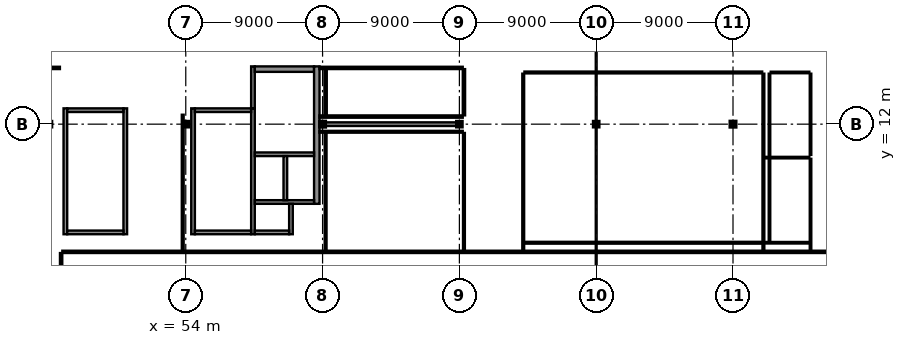
"""IFC4 building model, lengths in metres.
Left out: names, types, materials, properties, quantities, classifications, styles, units other than length and angle.
Written with IfcOpenShell. Run it as: python <this file> out.ifc"""

import sys

from ifc_helpers import new_model, si_unit, direction, frame, frame_2d, origin, origin_2d, place, context, subcontext, project, spatial, rectangle, i_section, extrude, element, fill, save


model = new_model("IFC4")
c1 = context("Model", 3, precision=1e-05, world=origin(), true_north=direction((0.0, 1.0)))
c2 = subcontext(c1, "Body", "Model", "MODEL_VIEW")
j1 = project(units=[si_unit("LENGTHUNIT", "METRE"), si_unit("PLANEANGLEUNIT", "RADIAN")], contexts=[c1])
p1 = place(None, origin())
s1 = spatial("IfcSite", under=j1, at=p1, CompositionType="ELEMENT")
p2 = place(p1, origin())
s2 = spatial("IfcBuilding", under=s1, at=p2, CompositionType="ELEMENT")
p3 = place(p2, frame((0.0, 0.0, 35.4)))
s3 = spatial("IfcBuildingStorey", under=s2, at=p3, CompositionType="ELEMENT", Elevation=35.4)
p4 = place(p3, frame((54.0, 12.0, 0.0), z_axis=(0.0, 0.0, 1.0), x_axis=(1.0, 0.0, 0.0)))
e1 = element("IfcColumn", 1, at=p4, inside=s3, PredefinedType="COLUMN", context=c2, shape_type="SweptSolid", body=[
    extrude(i_section(OverallWidth=0.26, OverallDepth=0.26, WebThickness=0.01, FlangeThickness=0.018, at=origin_2d()), origin(), (0.0, 0.0, 1.0), 3.8),
])
p5 = place(p3, frame((63.0, 12.0, 0.0), z_axis=(0.0, 0.0, 1.0), x_axis=(1.0, 0.0, 0.0)))
e2 = element("IfcColumn", 2, at=p5, inside=s3, PredefinedType="COLUMN", context=c2, shape_type="SweptSolid", body=[
    extrude(i_section(OverallWidth=0.28, OverallDepth=0.28, WebThickness=0.01, FlangeThickness=0.018, at=origin_2d()), origin(), (0.0, 0.0, 1.0), 3.8),
])
for number, where, z_axis, x_axis in (
    (3, (72.0, 12.0, 0.0), (0.0, 0.0, 1.0), (0.0, 1.0, 0.0)),
    (4, (81.0, 12.0, 0.0), (0.0, 0.0, 1.0), (1.0, 0.0, 0.0)),
):
    element("IfcColumn", number, at=place(p3, frame(where, z_axis=z_axis, x_axis=x_axis)), inside=s3, PredefinedType="COLUMN", context=c2, shape_type="SweptSolid", body=[
        extrude(i_section(OverallWidth=0.26, OverallDepth=0.26, WebThickness=0.01, FlangeThickness=0.018, at=origin_2d()), origin(), (0.0, 0.0, 1.0), 3.8),
    ])
p6 = place(p3, frame((90.0, 12.0, 0.0), z_axis=(0.0, 0.0, 1.0), x_axis=(1.0, 0.0, 0.0)))
e5 = element("IfcColumn", 5, at=p6, inside=s3, PredefinedType="COLUMN", context=c2, shape_type="SweptSolid", body=[
    extrude(i_section(OverallWidth=0.28, OverallDepth=0.28, WebThickness=0.01, FlangeThickness=0.018, at=origin_2d()), origin(), (0.0, 0.0, 1.0), 3.8),
])
p7 = place(p3, frame((54.48, 4.76, 0.0), z_axis=(0.0, 0.0, 1.0), x_axis=(0.0, 1.0, 0.0)))
e6 = element("IfcWall", 6, at=p7, inside=s3, PredefinedType="SHEAR", context=c2, shape_type="SweptSolid", body=[
    extrude(rectangle(XDim=8.28, YDim=0.24, at=frame_2d((4.14, 0.0))), origin(), (0.0, 0.0, 1.0), 3.81),
])
p8 = place(p3, frame((58.42, 4.76, 0.0), z_axis=(0.0, 0.0, 1.0), x_axis=(0.0, 1.0, 0.0)))
e7 = element("IfcWall", 7, at=p8, inside=s3, PredefinedType="SHEAR", context=c2, shape_type="SweptSolid", body=[
    extrude(rectangle(XDim=8.28, YDim=0.24, at=frame_2d((4.14, 0.0))), origin(), (0.0, 0.0, 1.0), 3.81),
])
p9 = place(p8, frame((6.49, 0.0, 0.0)))
e8 = element("IfcOpeningElement", 8, at=p9, cuts=e7, PredefinedType="OPENING", context=c2, shape_type="SweptSolid", body=[
    extrude(rectangle(XDim=1.3, YDim=2.2, at=frame_2d((0.65, 1.1))), frame((0.0, 0.135, 0.0), z_axis=(0.0, -1.0, 0.0), x_axis=(1.0, 0.0, 0.0)), (0.0, 0.0, 1.0), 0.27),
])
for number, where, z_axis, x_axis in (
    (9, (54.6, 4.88, 0.0), (0.0, 0.0, 1.0), (1.0, 0.0, 0.0)),
    (10, (54.6, 12.92, 0.0), (0.0, 0.0, 1.0), (1.0, 0.0, 0.0)),
):
    element("IfcWall", number, at=place(p3, frame(where, z_axis=z_axis, x_axis=x_axis)), inside=s3, PredefinedType="SHEAR", context=c2, shape_type="SweptSolid", body=[
        extrude(rectangle(XDim=3.7, YDim=0.24, at=frame_2d((1.85, 0.0))), origin(), (0.0, 0.0, 1.0), 3.81),
    ])
p10 = place(p3, frame((46.08, 4.76, 0.0), z_axis=(0.0, 0.0, 1.0), x_axis=(0.0, 1.0, 0.0)))
e11 = element("IfcWall", 11, at=p10, inside=s3, PredefinedType="SHEAR", context=c2, shape_type="SweptSolid", body=[
    extrude(rectangle(XDim=8.28, YDim=0.24, at=frame_2d((4.14, 0.0))), origin(), (0.0, 0.0, 1.0), 3.81),
])
p11 = place(p3, frame((50.02, 4.76, 0.0), z_axis=(0.0, 0.0, 1.0), x_axis=(0.0, 1.0, 0.0)))
e12 = element("IfcWall", 12, at=p11, inside=s3, PredefinedType="SHEAR", context=c2, shape_type="SweptSolid", body=[
    extrude(rectangle(XDim=8.28, YDim=0.24, at=frame_2d((4.14, 0.0))), origin(), (0.0, 0.0, 1.0), 3.81),
])
p12 = place(p11, frame((6.49, 0.0, 0.0)))
e13 = element("IfcOpeningElement", 13, at=p12, cuts=e12, PredefinedType="OPENING", context=c2, shape_type="SweptSolid", body=[
    extrude(rectangle(XDim=1.3, YDim=2.2, at=frame_2d((0.65, 1.1))), frame((0.0, 0.135, 0.0), z_axis=(0.0, -1.0, 0.0), x_axis=(1.0, 0.0, 0.0)), (0.0, 0.0, 1.0), 0.27),
])
for number, where, z_axis, x_axis in (
    (14, (46.2, 4.88, 0.0), (0.0, 0.0, 1.0), (1.0, 0.0, 0.0)),
    (15, (46.2, 12.92, 0.0), (0.0, 0.0, 1.0), (1.0, 0.0, 0.0)),
):
    element("IfcWall", number, at=place(p3, frame(where, z_axis=z_axis, x_axis=x_axis)), inside=s3, PredefinedType="SHEAR", context=c2, shape_type="SweptSolid", body=[
        extrude(rectangle(XDim=3.7, YDim=0.24, at=frame_2d((1.85, 0.0))), origin(), (0.0, 0.0, 1.0), 3.81),
    ])
p13 = place(p3, frame((58.42, 13.04, 0.0), z_axis=(0.0, 0.0, 1.0), x_axis=(0.0, 1.0, 0.0)))
e16 = element("IfcWall", 16, at=p13, inside=s3, PredefinedType="SHEAR", context=c2, shape_type="SweptSolid", body=[
    extrude(rectangle(XDim=2.76, YDim=0.24, at=frame_2d((1.38, 0.0))), origin(), (0.0, 0.0, 1.0), 3.66),
])
p14 = place(p3, frame((58.54, 15.62, 0.0), z_axis=(0.0, 0.0, 1.0), x_axis=(1.0, 0.0, 0.0)))
e17 = element("IfcWall", 17, at=p14, inside=s3, PredefinedType="SHEAR", context=c2, shape_type="SweptSolid", body=[
    extrude(rectangle(XDim=3.9, YDim=0.36, at=frame_2d((1.95, 0.0))), origin(), (0.0, 0.0, 1.0), 3.66),
])
p15 = place(p14, frame((1.15, 0.0, 0.0)))
e18 = element("IfcOpeningElement", 18, at=p15, cuts=e17, PredefinedType="OPENING", context=c2, shape_type="SweptSolid", body=[
    extrude(rectangle(XDim=1.6, YDim=2.25, at=frame_2d((0.8, 1.125))), frame((0.0, 0.195, 0.0), z_axis=(0.0, -1.0, 0.0), x_axis=(1.0, 0.0, 0.0)), (0.0, 0.0, 1.0), 0.39),
])
p16 = place(p3, frame((62.62, 6.76, 0.0), z_axis=(0.0, 0.0, 1.0), x_axis=(0.0, 1.0, 0.0)))
e19 = element("IfcWall", 19, at=p16, inside=s3, PredefinedType="SHEAR", context=c2, shape_type="SweptSolid", body=[
    extrude(rectangle(XDim=9.04, YDim=0.36, at=frame_2d((4.52, 0.0))), origin(), (0.0, 0.0, 1.0), 3.66),
])
p17 = place(p3, frame((58.54, 10.02, 0.0), z_axis=(0.0, 0.0, 1.0), x_axis=(1.0, 0.0, 0.0)))
e20 = element("IfcWall", 20, at=p17, inside=s3, PredefinedType="SHEAR", context=c2, shape_type="SweptSolid", body=[
    extrude(rectangle(XDim=3.9, YDim=0.24, at=frame_2d((1.95, 0.0))), origin(), (0.0, 0.0, 1.0), 3.81),
])
p18 = place(p17, frame((0.235, 0.0, 0.0)))
e21 = element("IfcOpeningElement", 21, at=p18, cuts=e20, PredefinedType="OPENING", context=c2, shape_type="SweptSolid", body=[
    extrude(rectangle(XDim=1.6, YDim=2.3, at=frame_2d((0.8, 1.15))), frame((0.0, 0.135, 0.0), z_axis=(0.0, -1.0, 0.0), x_axis=(1.0, 0.0, 0.0)), (0.0, 0.0, 1.0), 0.27),
])
p19 = place(p17, frame((2.185, 0.0, 0.0)))
e22 = element("IfcOpeningElement", 22, at=p19, cuts=e20, PredefinedType="OPENING", context=c2, shape_type="SweptSolid", body=[
    extrude(rectangle(XDim=1.6, YDim=2.3, at=frame_2d((0.8, 1.15))), frame((0.0, 0.135, 0.0), z_axis=(0.0, -1.0, 0.0), x_axis=(1.0, 0.0, 0.0)), (0.0, 0.0, 1.0), 0.27),
])
p20 = place(p3, frame((58.54, 6.88, 0.0), z_axis=(0.0, 0.0, 1.0), x_axis=(1.0, 0.0, 0.0)))
e23 = element("IfcWall", 23, at=p20, inside=s3, PredefinedType="SHEAR", context=c2, shape_type="SweptSolid", body=[
    extrude(rectangle(XDim=3.9, YDim=0.24, at=frame_2d((1.95, 0.0))), origin(), (0.0, 0.0, 1.0), 3.81),
])
p21 = place(p3, frame((60.55, 7.0, 0.0), z_axis=(0.0, 0.0, 1.0), x_axis=(0.0, 1.0, 0.0)))
e24 = element("IfcWall", 24, at=p21, inside=s3, PredefinedType="SHEAR", context=c2, shape_type="SweptSolid", body=[
    extrude(rectangle(XDim=2.9, YDim=0.24, at=frame_2d((1.45, 0.0))), origin(), (0.0, 0.0, 1.0), 3.81),
])
p22 = place(p3, frame((60.92, 4.76, 0.0), z_axis=(0.0, 0.0, 1.0), x_axis=(0.0, 1.0, 0.0)))
e25 = element("IfcWall", 25, at=p22, inside=s3, PredefinedType="SHEAR", context=c2, shape_type="SweptSolid", body=[
    extrude(rectangle(XDim=2.0, YDim=0.24, at=frame_2d((1.0, 0.0))), origin(), (0.0, 0.0, 1.0), 3.81),
])
p23 = place(p3, frame((58.54, 4.88, 0.0), z_axis=(0.0, 0.0, 1.0), x_axis=(1.0, 0.0, 0.0)))
e26 = element("IfcWall", 26, at=p23, inside=s3, PredefinedType="SHEAR", context=c2, shape_type="SweptSolid", body=[
    extrude(rectangle(XDim=2.26, YDim=0.24, at=frame_2d((1.13, 0.0))), origin(), (0.0, 0.0, 1.0), 3.81),
])
p24 = place(p3, frame((63.008, 12.0, 0.0), z_axis=(0.0, 0.0, 1.0), x_axis=(1.0, 0.0, 0.0)))
e27 = element("IfcWall", 27, at=p24, inside=s3, PredefinedType="SHEAR", context=c2, shape_type="SweptSolid", body=[
    extrude(rectangle(XDim=8.864, YDim=0.24, at=frame_2d((4.432, 0.0))), origin(), (0.0, 0.0, 1.0), 3.255),
])
p25 = place(p3, frame((45.8, 0.235, 0.0), z_axis=(0.0, 0.0, 1.0), x_axis=(0.0, 1.0, 0.0)))
e28 = element("IfcWall", 28, at=p25, inside=s3, PredefinedType="PARTITIONING", context=c2, shape_type="SweptSolid", body=[
    extrude(rectangle(XDim=3.285, YDim=0.15, at=frame_2d((1.643, 0.0))), origin(), (0.0, 0.0, 1.0), 3.64),
])
p26 = place(p3, frame((45.88, 3.6, 0.0), z_axis=(0.0, 0.0, 1.0), x_axis=(1.0, 0.0, 0.0)))
e29 = element("IfcWall", 29, at=p26, inside=s3, PredefinedType="PARTITIONING", context=c2, shape_type="SweptSolid", body=[
    extrude(rectangle(XDim=58.24, YDim=0.15, at=frame_2d((29.12, 0.0))), origin(), (0.0, 0.0, 1.0), 3.64),
])
p27 = place(p26, frame((27.795, 0.0, 0.0)))
e30 = element("IfcOpeningElement", 30, at=p27, cuts=e29, PredefinedType="OPENING", context=c2, shape_type="SweptSolid", body=[
    extrude(rectangle(XDim=1.05, YDim=2.25, at=frame_2d((0.525, 1.125))), frame((0.0, 0.09, 0.0), z_axis=(0.0, -1.0, 0.0), x_axis=(1.0, 0.0, 0.0)), (0.0, 0.0, 1.0), 0.18),
])
p28 = place(p3, frame((53.8, 12.62, 0.0), z_axis=(0.0, 0.0, 1.0), x_axis=(0.0, -1.0, 0.0)))
e31 = element("IfcWall", 31, at=p28, inside=s3, PredefinedType="PARTITIONING", context=c2, shape_type="SweptSolid", body=[
    extrude(rectangle(XDim=8.95, YDim=0.12, at=frame_2d((4.475, 0.0))), origin(), (0.0, 0.0, 1.0), 3.305),
])
p29 = place(p3, frame((32.635, 15.7, 0.0), z_axis=(0.0, 0.0, 1.0), x_axis=(1.0, 0.0, 0.0)))
e32 = element("IfcWall", 32, at=p29, inside=s3, PredefinedType="PARTITIONING", context=c2, shape_type="SweptSolid", body=[
    extrude(rectangle(XDim=13.085, YDim=0.15, at=frame_2d((6.542, 0.0))), origin(), (0.0, 0.0, 1.0), 3.64),
])
p30 = place(p29, frame((6.017, 0.0, 0.0)))
e33 = element("IfcOpeningElement", 33, at=p30, cuts=e32, PredefinedType="OPENING", context=c2, shape_type="SweptSolid", body=[
    extrude(rectangle(XDim=1.05, YDim=2.25, at=frame_2d((0.525, 1.125))), frame((0.0, 0.09, 0.0), z_axis=(0.0, -1.0, 0.0), x_axis=(1.0, 0.0, 0.0)), (0.0, 0.0, 1.0), 0.18),
])
p31 = place(p3, frame((62.795, 11.5, 0.0), z_axis=(0.0, 0.0, 1.0), x_axis=(1.0, 0.0, 0.0)))
e34 = element("IfcWall", 34, at=p31, inside=s3, PredefinedType="PARTITIONING", context=c2, shape_type="SweptSolid", body=[
    extrude(rectangle(XDim=9.425, YDim=0.12, at=frame_2d((4.712, 0.0))), origin(), (0.0, 0.0, 1.0), 3.64),
])
p32 = place(p3, frame((72.3, 11.42, 0.0), z_axis=(0.0, 0.0, 1.0), x_axis=(0.0, -1.0, 0.0)))
e35 = element("IfcWall", 35, at=p32, inside=s3, PredefinedType="PARTITIONING", context=c2, shape_type="SweptSolid", body=[
    extrude(rectangle(XDim=7.75, YDim=0.12, at=frame_2d((3.875, 0.0))), origin(), (0.0, 0.0, 1.0), 3.64),
])
p33 = place(p32, frame((3.4, 0.0, 0.0)))
e36 = element("IfcOpeningElement", 36, at=p33, cuts=e35, PredefinedType="OPENING", context=c2, shape_type="SweptSolid", body=[
    extrude(rectangle(XDim=0.95, YDim=2.15, at=frame_2d((0.475, 1.075))), frame((0.0, 0.075, 0.0), z_axis=(0.0, -1.0, 0.0), x_axis=(1.0, 0.0, 0.0)), (0.0, 0.0, 1.0), 0.15),
])
p34 = place(p3, frame((63.2, 3.67, 0.0), z_axis=(0.0, 0.0, 1.0), x_axis=(0.0, 1.0, 0.0)))
e37 = element("IfcWall", 37, at=p34, inside=s3, PredefinedType="PARTITIONING", context=c2, shape_type="SweptSolid", body=[
    extrude(rectangle(XDim=7.775, YDim=0.12, at=frame_2d((3.888, 0.0))), origin(), (0.0, 0.0, 1.0), 3.245),
])
p35 = place(p3, frame((72.3, 15.62, 0.0), z_axis=(0.0, 0.0, 1.0), x_axis=(0.0, -1.0, 0.0)))
e38 = element("IfcWall", 38, at=p35, inside=s3, PredefinedType="PARTITIONING", context=c2, shape_type="SweptSolid", body=[
    extrude(rectangle(XDim=3.04, YDim=0.15, at=frame_2d((1.52, 0.0))), origin(), (0.0, 0.0, 1.0), 3.64),
])
p36 = place(p3, frame((72.22, 12.5, 0.0), z_axis=(0.0, 0.0, 1.0), x_axis=(-1.0, 0.0, 0.0)))
e39 = element("IfcWall", 39, at=p36, inside=s3, PredefinedType="PARTITIONING", context=c2, shape_type="SweptSolid", body=[
    extrude(rectangle(XDim=9.425, YDim=0.15, at=frame_2d((4.712, 0.0))), origin(), (0.0, 0.0, 1.0), 3.64),
])
p37 = place(p3, frame((63.2, 12.57, 0.0), z_axis=(0.0, 0.0, 1.0), x_axis=(0.0, 1.0, 0.0)))
e40 = element("IfcWall", 40, at=p37, inside=s3, PredefinedType="PARTITIONING", context=c2, shape_type="SweptSolid", body=[
    extrude(rectangle(XDim=3.05, YDim=0.15, at=frame_2d((1.525, 0.0))), origin(), (0.0, 0.0, 1.0), 3.245),
])
p38 = place(p3, frame((62.795, 15.7, 0.0), z_axis=(0.0, 0.0, 1.0), x_axis=(1.0, 0.0, 0.0)))
e41 = element("IfcWall", 41, at=p38, inside=s3, PredefinedType="PARTITIONING", context=c2, shape_type="SweptSolid", body=[
    extrude(rectangle(XDim=9.425, YDim=0.15, at=frame_2d((4.712, 0.0))), origin(), (0.0, 0.0, 1.0), 3.64),
])
p39 = place(p38, frame((4.187, 0.0, 0.0)))
e42 = element("IfcOpeningElement", 42, at=p39, cuts=e41, PredefinedType="OPENING", context=c2, shape_type="SweptSolid", body=[
    extrude(rectangle(XDim=1.05, YDim=2.25, at=frame_2d((0.525, 1.125))), frame((0.0, 0.09, 0.0), z_axis=(0.0, -1.0, 0.0), x_axis=(1.0, 0.0, 0.0)), (0.0, 0.0, 1.0), 0.18),
])
p40 = place(p3, frame((91.92, 4.2, 0.0), z_axis=(0.0, 0.0, 1.0), x_axis=(-1.0, 0.0, 0.0)))
e43 = element("IfcWall", 43, at=p40, inside=s3, PredefinedType="PARTITIONING", context=c2, shape_type="SweptSolid", body=[
    extrude(rectangle(XDim=15.64, YDim=0.12, at=frame_2d((7.82, 0.0))), origin(), (0.0, 0.0, 1.0), 3.64),
])
p41 = place(p3, frame((76.2, 3.67, 0.0), z_axis=(0.0, 0.0, 1.0), x_axis=(0.0, 1.0, 0.0)))
e44 = element("IfcWall", 44, at=p41, inside=s3, PredefinedType="PARTITIONING", context=c2, shape_type="SweptSolid", body=[
    extrude(rectangle(XDim=11.65, YDim=0.12, at=frame_2d((5.825, 0.0))), origin(), (0.0, 0.0, 1.0), 3.64),
])
p42 = place(p3, frame((76.28, 15.4, 0.0), z_axis=(0.0, 0.0, 1.0), x_axis=(1.0, 0.0, 0.0)))
e45 = element("IfcWall", 45, at=p42, inside=s3, PredefinedType="PARTITIONING", context=c2, shape_type="SweptSolid", body=[
    extrude(rectangle(XDim=15.64, YDim=0.12, at=frame_2d((7.82, 0.0))), origin(), (0.0, 0.0, 1.0), 3.64),
])
p43 = place(p42, frame((7.37, 0.0, 0.0)))
e46 = element("IfcOpeningElement", 46, at=p43, cuts=e45, PredefinedType="OPENING", context=c2, shape_type="SweptSolid", body=[
    extrude(rectangle(XDim=0.9, YDim=2.1, at=frame_2d((0.45, 1.05))), frame((0.0, 0.075, 0.0), z_axis=(0.0, -1.0, 0.0), x_axis=(1.0, 0.0, 0.0)), (0.0, 0.0, 1.0), 0.15),
])
p44 = place(p3, frame((92.0, 15.32, 0.0), z_axis=(0.0, 0.0, 1.0), x_axis=(0.0, -1.0, 0.0)))
e47 = element("IfcWall", 47, at=p44, inside=s3, PredefinedType="PARTITIONING", context=c2, shape_type="SweptSolid", body=[
    extrude(rectangle(XDim=11.65, YDim=0.12, at=frame_2d((5.825, 0.0))), origin(), (0.0, 0.0, 1.0), 3.64),
])
p45 = place(p3, frame((95.02, 4.2, 0.0), z_axis=(0.0, 0.0, 1.0), x_axis=(-1.0, 0.0, 0.0)))
e48 = element("IfcWall", 48, at=p45, inside=s3, PredefinedType="PARTITIONING", context=c2, shape_type="SweptSolid", body=[
    extrude(rectangle(XDim=2.965, YDim=0.1, at=frame_2d((1.482, 0.0))), origin(), (0.0, 0.0, 1.0), 3.64),
])
p46 = place(p3, frame((92.4, 4.245, 0.0), z_axis=(0.0, 0.0, 1.0), x_axis=(0.0, 1.0, 0.0)))
e49 = element("IfcWall", 49, at=p46, inside=s3, PredefinedType="PARTITIONING", context=c2, shape_type="SweptSolid", body=[
    extrude(rectangle(XDim=5.475, YDim=0.1, at=frame_2d((2.737, 0.0))), origin(), (0.0, 0.0, 1.0), 3.64),
])
p47 = place(p3, frame((92.055, 9.8, 0.0), z_axis=(0.0, 0.0, 1.0), x_axis=(1.0, 0.0, 0.0)))
e50 = element("IfcWall", 50, at=p47, inside=s3, PredefinedType="PARTITIONING", context=c2, shape_type="SweptSolid", body=[
    extrude(rectangle(XDim=2.965, YDim=0.1, at=frame_2d((1.482, 0.0))), origin(), (0.0, 0.0, 1.0), 3.64),
])
p48 = place(p3, frame((95.1, 9.72, 0.0), z_axis=(0.0, 0.0, 1.0), x_axis=(0.0, -1.0, 0.0)))
e51 = element("IfcWall", 51, at=p48, inside=s3, PredefinedType="PARTITIONING", context=c2, shape_type="SweptSolid", body=[
    extrude(rectangle(XDim=6.05, YDim=0.1, at=frame_2d((3.025, 0.0))), origin(), (0.0, 0.0, 1.0), 3.64),
])
p49 = place(p48, frame((2.529, 0.0, 0.0)))
e52 = element("IfcOpeningElement", 52, at=p49, cuts=e51, PredefinedType="OPENING", context=c2, shape_type="SweptSolid", body=[
    extrude(rectangle(XDim=0.9, YDim=2.05, at=frame_2d((0.45, 1.025))), frame((0.0, 0.065, 0.0), z_axis=(0.0, -1.0, 0.0), x_axis=(1.0, 0.0, 0.0)), (0.0, 0.0, 1.0), 0.13),
])
p50 = place(p3, frame((92.48, 15.4, 0.0), z_axis=(0.0, 0.0, 1.0), x_axis=(1.0, 0.0, 0.0)))
e53 = element("IfcWall", 53, at=p50, inside=s3, PredefinedType="PARTITIONING", context=c2, shape_type="SweptSolid", body=[
    extrude(rectangle(XDim=2.54, YDim=0.1, at=frame_2d((1.27, 0.0))), origin(), (0.0, 0.0, 1.0), 3.64),
])
p51 = place(p3, frame((95.1, 15.32, 0.0), z_axis=(0.0, 0.0, 1.0), x_axis=(0.0, -1.0, 0.0)))
e54 = element("IfcWall", 54, at=p51, inside=s3, PredefinedType="PARTITIONING", context=c2, shape_type="SweptSolid", body=[
    extrude(rectangle(XDim=5.34, YDim=0.1, at=frame_2d((2.67, 0.0))), origin(), (0.0, 0.0, 1.0), 3.64),
])
p52 = place(p51, frame((2.22, 0.0, 0.0)))
e55 = element("IfcOpeningElement", 55, at=p52, cuts=e54, PredefinedType="OPENING", context=c2, shape_type="SweptSolid", body=[
    extrude(rectangle(XDim=0.9, YDim=2.05, at=frame_2d((0.45, 1.025))), frame((0.0, 0.065, 0.0), z_axis=(0.0, -1.0, 0.0), x_axis=(1.0, 0.0, 0.0)), (0.0, 0.0, 1.0), 0.13),
])
p53 = place(p3, frame((92.4, 9.845, 0.0), z_axis=(0.0, 0.0, 1.0), x_axis=(0.0, 1.0, 0.0)))
e56 = element("IfcWall", 56, at=p53, inside=s3, PredefinedType="PARTITIONING", context=c2, shape_type="SweptSolid", body=[
    extrude(rectangle(XDim=5.475, YDim=0.1, at=frame_2d((2.738, 0.0))), origin(), (0.0, 0.0, 1.0), 3.64),
])
p54 = place(p9, frame((1.3, 0.0, 0.0), z_axis=(0.0, 0.0, 1.0), x_axis=(-1.0, 0.0, 0.0)))
e57 = element("IfcDoor", 57, at=p54, inside=s3, OperationType="SINGLE_SWING_RIGHT", PredefinedType="DOOR", context=c2, shape_type="SweptSolid", body=[
    extrude(rectangle(XDim=1.3, YDim=2.2, at=frame_2d((0.65, 1.1))), frame((0.0, 0.025, 0.0), z_axis=(0.0, -1.0, 0.0), x_axis=(1.0, 0.0, 0.0)), (0.0, 0.0, 1.0), 0.05),
])
fill(e8, e57)
p55 = place(p12, frame((1.3, 0.0, 0.0), z_axis=(0.0, 0.0, 1.0), x_axis=(-1.0, 0.0, 0.0)))
e58 = element("IfcDoor", 58, at=p55, inside=s3, OperationType="SINGLE_SWING_RIGHT", PredefinedType="DOOR", context=c2, shape_type="SweptSolid", body=[
    extrude(rectangle(XDim=1.3, YDim=2.2, at=frame_2d((0.65, 1.1))), frame((0.0, 0.025, 0.0), z_axis=(0.0, -1.0, 0.0), x_axis=(1.0, 0.0, 0.0)), (0.0, 0.0, 1.0), 0.05),
])
fill(e13, e58)
p56 = place(p15, origin())
e59 = element("IfcDoor", 59, at=p56, inside=s3, OperationType="DOUBLE_DOOR_SINGLE_SWING", PredefinedType="DOOR", context=c2, shape_type="SweptSolid", body=[
    extrude(rectangle(XDim=1.6, YDim=2.25, at=frame_2d((0.8, 1.125))), frame((0.0, 0.025, 0.0), z_axis=(0.0, -1.0, 0.0), x_axis=(1.0, 0.0, 0.0)), (0.0, 0.0, 1.0), 0.05),
])
fill(e18, e59)
p57 = place(p18, origin())
e60 = element("IfcDoor", 60, at=p57, inside=s3, OperationType="DOUBLE_DOOR_SLIDING", PredefinedType="DOOR", context=c2, shape_type="SweptSolid", body=[
    extrude(rectangle(XDim=1.6, YDim=2.3, at=frame_2d((0.8, 1.15))), frame((0.0, 0.025, 0.0), z_axis=(0.0, -1.0, 0.0), x_axis=(1.0, 0.0, 0.0)), (0.0, 0.0, 1.0), 0.05),
])
fill(e21, e60)
p58 = place(p19, origin())
e61 = element("IfcDoor", 61, at=p58, inside=s3, OperationType="DOUBLE_DOOR_SLIDING", PredefinedType="DOOR", context=c2, shape_type="SweptSolid", body=[
    extrude(rectangle(XDim=1.6, YDim=2.3, at=frame_2d((0.8, 1.15))), frame((0.0, 0.025, 0.0), z_axis=(0.0, -1.0, 0.0), x_axis=(1.0, 0.0, 0.0)), (0.0, 0.0, 1.0), 0.05),
])
fill(e22, e61)
p59 = place(p27, origin())
e62 = element("IfcDoor", 62, at=p59, inside=s3, OperationType="SINGLE_SWING_LEFT", PredefinedType="DOOR", context=c2, shape_type="SweptSolid", body=[
    extrude(rectangle(XDim=1.05, YDim=2.25, at=frame_2d((0.525, 1.125))), frame((0.0, 0.025, 0.0), z_axis=(0.0, -1.0, 0.0), x_axis=(1.0, 0.0, 0.0)), (0.0, 0.0, 1.0), 0.05),
])
fill(e30, e62)
p60 = place(p33, origin())
e63 = element("IfcDoor", 63, at=p60, inside=s3, OperationType="SINGLE_SWING_RIGHT", PredefinedType="DOOR", context=c2, shape_type="SweptSolid", body=[
    extrude(rectangle(XDim=0.95, YDim=2.15, at=frame_2d((0.475, 1.075))), frame((0.0, 0.025, 0.0), z_axis=(0.0, -1.0, 0.0), x_axis=(1.0, 0.0, 0.0)), (0.0, 0.0, 1.0), 0.05),
])
fill(e36, e63)
p61 = place(p39, frame((1.05, 0.0, 0.0), z_axis=(0.0, 0.0, 1.0), x_axis=(-1.0, 0.0, 0.0)))
e64 = element("IfcDoor", 64, at=p61, inside=s3, OperationType="SINGLE_SWING_LEFT", PredefinedType="DOOR", context=c2, shape_type="SweptSolid", body=[
    extrude(rectangle(XDim=1.05, YDim=2.25, at=frame_2d((0.525, 1.125))), frame((0.0, 0.025, 0.0), z_axis=(0.0, -1.0, 0.0), x_axis=(1.0, 0.0, 0.0)), (0.0, 0.0, 1.0), 0.05),
])
fill(e42, e64)
p62 = place(p43, origin())
e65 = element("IfcDoor", 65, at=p62, inside=s3, OperationType="SINGLE_SWING_RIGHT", PredefinedType="DOOR", context=c2, shape_type="SweptSolid", body=[
    extrude(rectangle(XDim=0.9, YDim=2.1, at=frame_2d((0.45, 1.05))), frame((0.0, 0.025, 0.0), z_axis=(0.0, -1.0, 0.0), x_axis=(1.0, 0.0, 0.0)), (0.0, 0.0, 1.0), 0.05),
])
fill(e46, e65)
p63 = place(p49, frame((0.9, 0.0, 0.0), z_axis=(0.0, 0.0, 1.0), x_axis=(-1.0, 0.0, 0.0)))
e66 = element("IfcDoor", 66, at=p63, inside=s3, OperationType="SINGLE_SWING_LEFT", PredefinedType="DOOR", context=c2, shape_type="SweptSolid", body=[
    extrude(rectangle(XDim=0.9, YDim=2.05, at=frame_2d((0.45, 1.025))), frame((0.0, 0.025, 0.0), z_axis=(0.0, -1.0, 0.0), x_axis=(1.0, 0.0, 0.0)), (0.0, 0.0, 1.0), 0.05),
])
fill(e52, e66)
p64 = place(p52, origin())
e67 = element("IfcDoor", 67, at=p64, inside=s3, OperationType="SINGLE_SWING_RIGHT", PredefinedType="DOOR", context=c2, shape_type="SweptSolid", body=[
    extrude(rectangle(XDim=0.9, YDim=2.05, at=frame_2d((0.45, 1.025))), frame((0.0, 0.025, 0.0), z_axis=(0.0, -1.0, 0.0), x_axis=(1.0, 0.0, 0.0)), (0.0, 0.0, 1.0), 0.05),
])
fill(e55, e67)
save(model, sys.argv[1])
